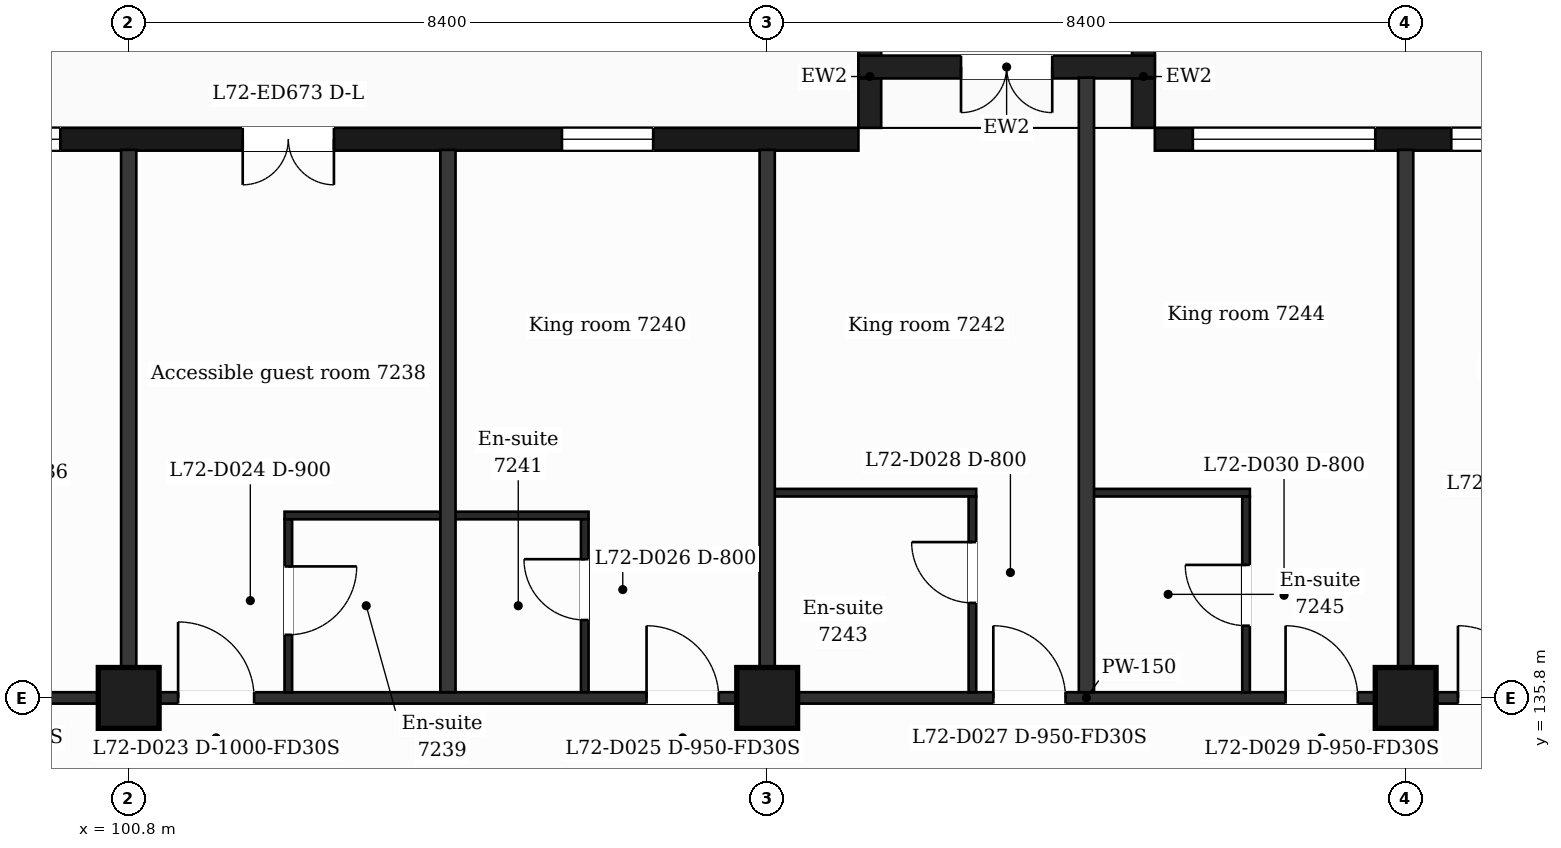
"""IFC4 building model, lengths in metres.
Left out: names, types, materials, properties, quantities, classifications, styles, units other than length and angle.
Written with IfcOpenShell. Run it as: python <this file> out.ifc"""

import sys

from ifc_helpers import new_model, si_unit, direction, frame, frame_2d, origin, origin_2d, place, context, subcontext, project, spatial, rectangle, extrude, element, fill, save


model = new_model("IFC4")
c1 = context("Model", 3, precision=1e-05, world=origin(), true_north=direction((0.0, 1.0)))
c2 = subcontext(c1, "Body", "Model", "MODEL_VIEW")
j1 = project(units=[si_unit("LENGTHUNIT", "METRE"), si_unit("PLANEANGLEUNIT", "RADIAN")], contexts=[c1])
p1 = place(None, origin())
s1 = spatial("IfcSite", under=j1, at=p1, CompositionType="ELEMENT")
p2 = place(p1, origin())
s2 = spatial("IfcBuilding", under=s1, at=p2, CompositionType="ELEMENT")
p3 = place(p2, frame((0.0, 0.0, 296.0)))
s3 = spatial("IfcBuildingStorey", under=s2, at=p3, CompositionType="ELEMENT", Elevation=296.0)
for number, where, z_axis, x_axis in (
    (1, (100.8, 135.8, 0.0), (0.0, 0.0, 1.0), (1.0, 0.0, 0.0)),
    (2, (109.2, 135.8, 0.0), (0.0, 0.0, 1.0), (1.0, 0.0, 0.0)),
    (3, (117.6, 135.8, 0.0), (0.0, 0.0, 1.0), (1.0, 0.0, 0.0)),
):
    element("IfcColumn", number, at=place(p3, frame(where, z_axis=z_axis, x_axis=x_axis)), inside=s3, PredefinedType="COLUMN", context=c2, shape_type="SweptSolid", body=[
        extrude(rectangle(XDim=0.8, YDim=0.8, at=origin_2d()), origin(), (0.0, 0.0, 1.0), 3.7),
    ])
p4 = place(p3, frame((130.65, 143.15, 0.0), z_axis=(0.0, 0.0, 1.0), x_axis=(-1.0, 0.0, 0.0)))
e4 = element("IfcWall", 4, at=p4, inside=s3, PredefinedType="SOLIDWALL", context=c2, shape_type="SweptSolid", body=[
    extrude(rectangle(XDim=16.35, YDim=0.3, at=frame_2d((8.175, 0.0))), origin(), (0.0, 0.0, 1.0), 3.38),
])
p5 = place(p4, frame((1.35, 0.0, 0.9)))
e5 = element("IfcOpeningElement", 5, at=p5, cuts=e4, PredefinedType="OPENING", context=c2, shape_type="SweptSolid", body=[
    extrude(rectangle(XDim=2.4, YDim=2.1, at=frame_2d((1.2, 1.05))), frame((0.0, 0.16, 0.0), z_axis=(0.0, -1.0, 0.0), x_axis=(1.0, 0.0, 0.0)), (0.0, 0.0, 1.0), 0.32),
])
p6 = place(p4, frame((5.55, 0.0, 0.9)))
e6 = element("IfcOpeningElement", 6, at=p6, cuts=e4, PredefinedType="OPENING", context=c2, shape_type="SweptSolid", body=[
    extrude(rectangle(XDim=2.4, YDim=2.1, at=frame_2d((1.2, 1.05))), frame((0.0, 0.16, 0.0), z_axis=(0.0, -1.0, 0.0), x_axis=(1.0, 0.0, 0.0)), (0.0, 0.0, 1.0), 0.32),
])
p7 = place(p4, frame((9.45, 0.0, 0.0)))
e7 = element("IfcOpeningElement", 7, at=p7, cuts=e4, PredefinedType="OPENING", context=c2, shape_type="SweptSolid", body=[
    extrude(rectangle(XDim=1.2, YDim=2.4, at=frame_2d((0.6, 1.2))), frame((0.0, 0.16, 0.0), z_axis=(0.0, -1.0, 0.0), x_axis=(1.0, 0.0, 0.0)), (0.0, 0.0, 1.0), 0.32),
])
p8 = place(p4, frame((11.25, 0.0, 0.9)))
e8 = element("IfcOpeningElement", 8, at=p8, cuts=e4, PredefinedType="OPENING", context=c2, shape_type="SweptSolid", body=[
    extrude(rectangle(XDim=1.2, YDim=2.1, at=frame_2d((0.6, 1.05))), frame((0.0, 0.16, 0.0), z_axis=(0.0, -1.0, 0.0), x_axis=(1.0, 0.0, 0.0)), (0.0, 0.0, 1.0), 0.32),
])
p9 = place(p4, frame((13.45, 0.0, 0.9)))
e9 = element("IfcOpeningElement", 9, at=p9, cuts=e4, PredefinedType="OPENING", context=c2, shape_type="SweptSolid", body=[
    extrude(rectangle(XDim=2.4, YDim=2.1, at=frame_2d((1.2, 1.05))), frame((0.0, 0.16, 0.0), z_axis=(0.0, -1.0, 0.0), x_axis=(1.0, 0.0, 0.0)), (0.0, 0.0, 1.0), 0.32),
])
p10 = place(p3, frame((110.4, 143.15, 0.0), z_axis=(0.0, 0.0, 1.0), x_axis=(-1.0, 0.0, 0.0)))
e10 = element("IfcWall", 10, at=p10, inside=s3, PredefinedType="SOLIDWALL", context=c2, shape_type="SweptSolid", body=[
    extrude(rectangle(XDim=14.4, YDim=0.3, at=frame_2d((7.2, 0.0))), origin(), (0.0, 0.0, 1.0), 3.38),
])
p11 = place(p10, frame((2.7, 0.0, 0.9)))
e11 = element("IfcOpeningElement", 11, at=p11, cuts=e10, PredefinedType="OPENING", context=c2, shape_type="SweptSolid", body=[
    extrude(rectangle(XDim=1.2, YDim=2.1, at=frame_2d((0.6, 1.05))), frame((0.0, 0.16, 0.0), z_axis=(0.0, -1.0, 0.0), x_axis=(1.0, 0.0, 0.0)), (0.0, 0.0, 1.0), 0.32),
])
p12 = place(p10, frame((6.9, 0.0, 0.0)))
e12 = element("IfcOpeningElement", 12, at=p12, cuts=e10, PredefinedType="OPENING", context=c2, shape_type="SweptSolid", body=[
    extrude(rectangle(XDim=1.2, YDim=2.4, at=frame_2d((0.6, 1.2))), frame((0.0, 0.16, 0.0), z_axis=(0.0, -1.0, 0.0), x_axis=(1.0, 0.0, 0.0)), (0.0, 0.0, 1.0), 0.32),
])
p13 = place(p10, frame((10.5, 0.0, 0.9)))
e13 = element("IfcOpeningElement", 13, at=p13, cuts=e10, PredefinedType="OPENING", context=c2, shape_type="SweptSolid", body=[
    extrude(rectangle(XDim=2.4, YDim=2.1, at=frame_2d((1.2, 1.05))), frame((0.0, 0.16, 0.0), z_axis=(0.0, -1.0, 0.0), x_axis=(1.0, 0.0, 0.0)), (0.0, 0.0, 1.0), 0.32),
])
for number, where, z_axis, x_axis in (
    (14, (114.15, 143.3, 0.0), (0.0, 0.0, 1.0), (0.0, 1.0, 0.0)),
    (15, (110.55, 143.3, 0.0), (0.0, 0.0, 1.0), (0.0, 1.0, 0.0)),
):
    element("IfcWall", number, at=place(p3, frame(where, z_axis=z_axis, x_axis=x_axis)), inside=s3, PredefinedType="SOLIDWALL", context=c2, shape_type="SweptSolid", body=[
        extrude(rectangle(XDim=1.35, YDim=0.3, at=frame_2d((0.675, 0.0))), origin(), (0.0, 0.0, 1.0), 3.38),
    ])
p14 = place(p3, frame((114.3, 144.1, 0.0), z_axis=(0.0, 0.0, 1.0), x_axis=(-1.0, 0.0, 0.0)))
e16 = element("IfcWall", 16, at=p14, inside=s3, PredefinedType="SOLIDWALL", context=c2, shape_type="SweptSolid", body=[
    extrude(rectangle(XDim=3.9, YDim=0.3, at=frame_2d((1.95, 0.0))), origin(), (0.0, 0.0, 1.0), 3.38),
])
p15 = place(p14, frame((1.35, 0.0, 0.0)))
e17 = element("IfcOpeningElement", 17, at=p15, cuts=e16, PredefinedType="OPENING", context=c2, shape_type="SweptSolid", body=[
    extrude(rectangle(XDim=1.2, YDim=2.4, at=frame_2d((0.6, 1.2))), frame((0.0, 0.16, 0.0), z_axis=(0.0, -1.0, 0.0), x_axis=(1.0, 0.0, 0.0)), (0.0, 0.0, 1.0), 0.32),
])
p16 = place(p3, frame((90.895, 135.8, 0.0), z_axis=(0.0, 0.0, 1.0), x_axis=(1.0, 0.0, 0.0)))
e18 = element("IfcWall", 18, at=p16, inside=s3, PredefinedType="PARTITIONING", context=c2, shape_type="SweptSolid", body=[
    extrude(rectangle(XDim=45.011, YDim=0.15, at=frame_2d((22.505, 0.0))), origin(), (0.0, 0.0, 1.0), 3.38),
])
p17 = place(p16, frame((6.906, 0.0, 0.0)))
e19 = element("IfcOpeningElement", 19, at=p17, cuts=e18, PredefinedType="OPENING", context=c2, shape_type="SweptSolid", body=[
    extrude(rectangle(XDim=1.0, YDim=2.1, at=frame_2d((0.5, 1.05))), frame((0.0, 0.085, 0.0), z_axis=(0.0, -1.0, 0.0), x_axis=(1.0, 0.0, 0.0)), (0.0, 0.0, 1.0), 0.17),
])
p18 = place(p16, frame((10.555, 0.0, 0.0)))
e20 = element("IfcOpeningElement", 20, at=p18, cuts=e18, PredefinedType="OPENING", context=c2, shape_type="SweptSolid", body=[
    extrude(rectangle(XDim=1.0, YDim=2.1, at=frame_2d((0.5, 1.05))), frame((0.0, 0.085, 0.0), z_axis=(0.0, -1.0, 0.0), x_axis=(1.0, 0.0, 0.0)), (0.0, 0.0, 1.0), 0.17),
])
p19 = place(p16, frame((16.719, 0.0, 0.0)))
e21 = element("IfcOpeningElement", 21, at=p19, cuts=e18, PredefinedType="OPENING", context=c2, shape_type="SweptSolid", body=[
    extrude(rectangle(XDim=0.95, YDim=2.1, at=frame_2d((0.475, 1.05))), frame((0.0, 0.085, 0.0), z_axis=(0.0, -1.0, 0.0), x_axis=(1.0, 0.0, 0.0)), (0.0, 0.0, 1.0), 0.17),
])
p20 = place(p16, frame((21.281, 0.0, 0.0)))
e22 = element("IfcOpeningElement", 22, at=p20, cuts=e18, PredefinedType="OPENING", context=c2, shape_type="SweptSolid", body=[
    extrude(rectangle(XDim=0.95, YDim=2.1, at=frame_2d((0.475, 1.05))), frame((0.0, 0.085, 0.0), z_axis=(0.0, -1.0, 0.0), x_axis=(1.0, 0.0, 0.0)), (0.0, 0.0, 1.0), 0.17),
])
p21 = place(p16, frame((25.125, 0.0, 0.0)))
e23 = element("IfcOpeningElement", 23, at=p21, cuts=e18, PredefinedType="OPENING", context=c2, shape_type="SweptSolid", body=[
    extrude(rectangle(XDim=0.95, YDim=2.1, at=frame_2d((0.475, 1.05))), frame((0.0, 0.085, 0.0), z_axis=(0.0, -1.0, 0.0), x_axis=(1.0, 0.0, 0.0)), (0.0, 0.0, 1.0), 0.17),
])
p22 = place(p16, frame((27.393, 0.0, 0.0)))
e24 = element("IfcOpeningElement", 24, at=p22, cuts=e18, PredefinedType="OPENING", context=c2, shape_type="SweptSolid", body=[
    extrude(rectangle(XDim=0.95, YDim=2.1, at=frame_2d((0.475, 1.05))), frame((0.0, 0.085, 0.0), z_axis=(0.0, -1.0, 0.0), x_axis=(1.0, 0.0, 0.0)), (0.0, 0.0, 1.0), 0.17),
])
p23 = place(p16, frame((33.518, 0.0, 0.0)))
e25 = element("IfcOpeningElement", 25, at=p23, cuts=e18, PredefinedType="OPENING", context=c2, shape_type="SweptSolid", body=[
    extrude(rectangle(XDim=0.95, YDim=2.1, at=frame_2d((0.475, 1.05))), frame((0.0, 0.085, 0.0), z_axis=(0.0, -1.0, 0.0), x_axis=(1.0, 0.0, 0.0)), (0.0, 0.0, 1.0), 0.17),
])
p24 = place(p16, frame((37.615, 0.0, 0.0)))
e26 = element("IfcOpeningElement", 26, at=p24, cuts=e18, PredefinedType="OPENING", context=c2, shape_type="SweptSolid", body=[
    extrude(rectangle(XDim=1.0, YDim=2.1, at=frame_2d((0.5, 1.05))), frame((0.0, 0.085, 0.0), z_axis=(0.0, -1.0, 0.0), x_axis=(1.0, 0.0, 0.0)), (0.0, 0.0, 1.0), 0.17),
])
p25 = place(p3, frame((102.85, 138.2, 0.0), z_axis=(0.0, 0.0, 1.0), x_axis=(1.0, 0.0, 0.0)))
e27 = element("IfcWall", 27, at=p25, inside=s3, PredefinedType="PARTITIONING", context=c2, shape_type="SweptSolid", body=[
    extrude(rectangle(XDim=4.0, YDim=0.1, at=frame_2d((2.0, 0.0))), origin(), (0.0, 0.0, 1.0), 3.38),
])
p26 = place(p3, frame((109.2, 138.5, 0.0), z_axis=(0.0, 0.0, 1.0), x_axis=(1.0, 0.0, 0.0)))
e28 = element("IfcWall", 28, at=p26, inside=s3, PredefinedType="PARTITIONING", context=c2, shape_type="SweptSolid", body=[
    extrude(rectangle(XDim=2.75, YDim=0.1, at=frame_2d((1.375, 0.0))), origin(), (0.0, 0.0, 1.0), 3.38),
])
p27 = place(p3, frame((113.4, 138.5, 0.0), z_axis=(0.0, 0.0, 1.0), x_axis=(1.0, 0.0, 0.0)))
e29 = element("IfcWall", 29, at=p27, inside=s3, PredefinedType="PARTITIONING", context=c2, shape_type="SweptSolid", body=[
    extrude(rectangle(XDim=2.15, YDim=0.1, at=frame_2d((1.075, 0.0))), origin(), (0.0, 0.0, 1.0), 3.38),
])
p28 = place(p3, frame((100.8, 135.875, 0.0), z_axis=(0.0, 0.0, 1.0), x_axis=(0.0, 1.0, 0.0)))
e30 = element("IfcWall", 30, at=p28, inside=s3, PredefinedType="PARTITIONING", context=c2, shape_type="SweptSolid", body=[
    extrude(rectangle(XDim=7.135, YDim=0.2, at=frame_2d((3.567, 0.0))), origin(), (0.0, 0.0, 1.0), 3.38),
])
p29 = place(p3, frame((102.9, 135.875, 0.0), z_axis=(0.0, 0.0, 1.0), x_axis=(0.0, 1.0, 0.0)))
e31 = element("IfcWall", 31, at=p29, inside=s3, PredefinedType="PARTITIONING", context=c2, shape_type="SweptSolid", body=[
    extrude(rectangle(XDim=2.275, YDim=0.1, at=frame_2d((1.137, 0.0))), origin(), (0.0, 0.0, 1.0), 3.38),
])
p30 = place(p29, frame((0.755, 0.0, 0.0)))
e32 = element("IfcOpeningElement", 32, at=p30, cuts=e31, PredefinedType="OPENING", context=c2, shape_type="SweptSolid", body=[
    extrude(rectangle(XDim=0.9, YDim=2.1, at=frame_2d((0.45, 1.05))), frame((0.0, 0.06, 0.0), z_axis=(0.0, -1.0, 0.0), x_axis=(1.0, 0.0, 0.0)), (0.0, 0.0, 1.0), 0.12),
])
p31 = place(p3, frame((105.0, 135.875, 0.0), z_axis=(0.0, 0.0, 1.0), x_axis=(0.0, 1.0, 0.0)))
e33 = element("IfcWall", 33, at=p31, inside=s3, PredefinedType="PARTITIONING", context=c2, shape_type="SweptSolid", body=[
    extrude(rectangle(XDim=7.135, YDim=0.2, at=frame_2d((3.567, 0.0))), origin(), (0.0, 0.0, 1.0), 3.38),
])
p32 = place(p3, frame((106.8, 135.875, 0.0), z_axis=(0.0, 0.0, 1.0), x_axis=(0.0, 1.0, 0.0)))
e34 = element("IfcWall", 34, at=p32, inside=s3, PredefinedType="PARTITIONING", context=c2, shape_type="SweptSolid", body=[
    extrude(rectangle(XDim=2.275, YDim=0.1, at=frame_2d((1.137, 0.0))), origin(), (0.0, 0.0, 1.0), 3.38),
])
p33 = place(p32, frame((0.95, 0.0, 0.0)))
e35 = element("IfcOpeningElement", 35, at=p33, cuts=e34, PredefinedType="OPENING", context=c2, shape_type="SweptSolid", body=[
    extrude(rectangle(XDim=0.8, YDim=2.1, at=frame_2d((0.4, 1.05))), frame((0.0, 0.06, 0.0), z_axis=(0.0, -1.0, 0.0), x_axis=(1.0, 0.0, 0.0)), (0.0, 0.0, 1.0), 0.12),
])
p34 = place(p3, frame((109.2, 135.875, 0.0), z_axis=(0.0, 0.0, 1.0), x_axis=(0.0, 1.0, 0.0)))
e36 = element("IfcWall", 36, at=p34, inside=s3, PredefinedType="PARTITIONING", context=c2, shape_type="SweptSolid", body=[
    extrude(rectangle(XDim=7.135, YDim=0.2, at=frame_2d((3.567, 0.0))), origin(), (0.0, 0.0, 1.0), 3.38),
])
p35 = place(p3, frame((111.9, 135.875, 0.0), z_axis=(0.0, 0.0, 1.0), x_axis=(0.0, 1.0, 0.0)))
e37 = element("IfcWall", 37, at=p35, inside=s3, PredefinedType="PARTITIONING", context=c2, shape_type="SweptSolid", body=[
    extrude(rectangle(XDim=2.575, YDim=0.1, at=frame_2d((1.288, 0.0))), origin(), (0.0, 0.0, 1.0), 3.38),
])
p36 = place(p35, frame((1.175, 0.0, 0.0)))
e38 = element("IfcOpeningElement", 38, at=p36, cuts=e37, PredefinedType="OPENING", context=c2, shape_type="SweptSolid", body=[
    extrude(rectangle(XDim=0.8, YDim=2.1, at=frame_2d((0.4, 1.05))), frame((0.0, 0.06, 0.0), z_axis=(0.0, -1.0, 0.0), x_axis=(1.0, 0.0, 0.0)), (0.0, 0.0, 1.0), 0.12),
])
p37 = place(p3, frame((113.4, 135.875, 0.0), z_axis=(0.0, 0.0, 1.0), x_axis=(0.0, 1.0, 0.0)))
e39 = element("IfcWall", 39, at=p37, inside=s3, PredefinedType="PARTITIONING", context=c2, shape_type="SweptSolid", body=[
    extrude(rectangle(XDim=8.085, YDim=0.2, at=frame_2d((4.042, 0.0))), origin(), (0.0, 0.0, 1.0), 3.38),
])
p38 = place(p3, frame((115.5, 135.875, 0.0), z_axis=(0.0, 0.0, 1.0), x_axis=(0.0, 1.0, 0.0)))
e40 = element("IfcWall", 40, at=p38, inside=s3, PredefinedType="PARTITIONING", context=c2, shape_type="SweptSolid", body=[
    extrude(rectangle(XDim=2.575, YDim=0.1, at=frame_2d((1.288, 0.0))), origin(), (0.0, 0.0, 1.0), 3.38),
])
p39 = place(p38, frame((0.875, 0.0, 0.0)))
e41 = element("IfcOpeningElement", 41, at=p39, cuts=e40, PredefinedType="OPENING", context=c2, shape_type="SweptSolid", body=[
    extrude(rectangle(XDim=0.8, YDim=2.1, at=frame_2d((0.4, 1.05))), frame((0.0, 0.06, 0.0), z_axis=(0.0, -1.0, 0.0), x_axis=(1.0, 0.0, 0.0)), (0.0, 0.0, 1.0), 0.12),
])
p40 = place(p3, frame((117.6, 135.875, 0.0), z_axis=(0.0, 0.0, 1.0), x_axis=(0.0, 1.0, 0.0)))
e42 = element("IfcWall", 42, at=p40, inside=s3, PredefinedType="PARTITIONING", context=c2, shape_type="SweptSolid", body=[
    extrude(rectangle(XDim=7.135, YDim=0.2, at=frame_2d((3.567, 0.0))), origin(), (0.0, 0.0, 1.0), 3.38),
])
p41 = place(p8, origin())
e43 = element("IfcWindow", 43, at=p41, inside=s3, PartitioningType="SINGLE_PANEL", PredefinedType="WINDOW", context=c2, shape_type="SweptSolid", body=[
    extrude(rectangle(XDim=1.2, YDim=2.1, at=frame_2d((0.6, 1.05))), frame((0.0, 0.03, 0.0), z_axis=(0.0, -1.0, 0.0), x_axis=(1.0, 0.0, 0.0)), (0.0, 0.0, 1.0), 0.06),
])
fill(e8, e43)
p42 = place(p9, origin())
e44 = element("IfcWindow", 44, at=p42, inside=s3, PartitioningType="SINGLE_PANEL", PredefinedType="WINDOW", context=c2, shape_type="SweptSolid", body=[
    extrude(rectangle(XDim=2.4, YDim=2.1, at=frame_2d((1.2, 1.05))), frame((0.0, 0.03, 0.0), z_axis=(0.0, -1.0, 0.0), x_axis=(1.0, 0.0, 0.0)), (0.0, 0.0, 1.0), 0.06),
])
fill(e9, e44)
p43 = place(p11, origin())
e45 = element("IfcWindow", 45, at=p43, inside=s3, PartitioningType="SINGLE_PANEL", PredefinedType="WINDOW", context=c2, shape_type="SweptSolid", body=[
    extrude(rectangle(XDim=1.2, YDim=2.1, at=frame_2d((0.6, 1.05))), frame((0.0, 0.03, 0.0), z_axis=(0.0, -1.0, 0.0), x_axis=(1.0, 0.0, 0.0)), (0.0, 0.0, 1.0), 0.06),
])
fill(e11, e45)
p44 = place(p12, origin())
e46 = element("IfcDoor", 46, at=p44, inside=s3, OperationType="DOUBLE_DOOR_SINGLE_SWING", PredefinedType="DOOR", context=c2, shape_type="SweptSolid", body=[
    extrude(rectangle(XDim=1.2, YDim=2.4, at=frame_2d((0.6, 1.2))), frame((0.0, 0.025, 0.0), z_axis=(0.0, -1.0, 0.0), x_axis=(1.0, 0.0, 0.0)), (0.0, 0.0, 1.0), 0.05),
])
fill(e12, e46)
p45 = place(p13, origin())
e47 = element("IfcWindow", 47, at=p45, inside=s3, PartitioningType="SINGLE_PANEL", PredefinedType="WINDOW", context=c2, shape_type="SweptSolid", body=[
    extrude(rectangle(XDim=2.4, YDim=2.1, at=frame_2d((1.2, 1.05))), frame((0.0, 0.03, 0.0), z_axis=(0.0, -1.0, 0.0), x_axis=(1.0, 0.0, 0.0)), (0.0, 0.0, 1.0), 0.06),
])
fill(e13, e47)
p46 = place(p15, origin())
e48 = element("IfcDoor", 48, at=p46, inside=s3, OperationType="DOUBLE_DOOR_SINGLE_SWING", PredefinedType="DOOR", context=c2, shape_type="SweptSolid", body=[
    extrude(rectangle(XDim=1.2, YDim=2.4, at=frame_2d((0.6, 1.2))), frame((0.0, 0.025, 0.0), z_axis=(0.0, -1.0, 0.0), x_axis=(1.0, 0.0, 0.0)), (0.0, 0.0, 1.0), 0.05),
])
fill(e17, e48)
p47 = place(p18, origin())
e49 = element("IfcDoor", 49, at=p47, inside=s3, OperationType="SINGLE_SWING_LEFT", PredefinedType="DOOR", context=c2, shape_type="SweptSolid", body=[
    extrude(rectangle(XDim=1.0, YDim=2.1, at=frame_2d((0.5, 1.05))), frame((0.0, 0.025, 0.0), z_axis=(0.0, -1.0, 0.0), x_axis=(1.0, 0.0, 0.0)), (0.0, 0.0, 1.0), 0.05),
])
fill(e20, e49)
p48 = place(p30, origin())
e50 = element("IfcDoor", 50, at=p48, inside=s3, OperationType="SINGLE_SWING_RIGHT", PredefinedType="DOOR", context=c2, shape_type="SweptSolid", body=[
    extrude(rectangle(XDim=0.9, YDim=2.1, at=frame_2d((0.45, 1.05))), frame((0.0, 0.025, 0.0), z_axis=(0.0, -1.0, 0.0), x_axis=(1.0, 0.0, 0.0)), (0.0, 0.0, 1.0), 0.05),
])
fill(e32, e50)
p49 = place(p19, origin())
e51 = element("IfcDoor", 51, at=p49, inside=s3, OperationType="SINGLE_SWING_LEFT", PredefinedType="DOOR", context=c2, shape_type="SweptSolid", body=[
    extrude(rectangle(XDim=0.95, YDim=2.1, at=frame_2d((0.475, 1.05))), frame((0.0, 0.025, 0.0), z_axis=(0.0, -1.0, 0.0), x_axis=(1.0, 0.0, 0.0)), (0.0, 0.0, 1.0), 0.05),
])
fill(e21, e51)
p50 = place(p33, origin())
e52 = element("IfcDoor", 52, at=p50, inside=s3, OperationType="SINGLE_SWING_RIGHT", PredefinedType="DOOR", context=c2, shape_type="SweptSolid", body=[
    extrude(rectangle(XDim=0.8, YDim=2.1, at=frame_2d((0.4, 1.05))), frame((0.0, 0.025, 0.0), z_axis=(0.0, -1.0, 0.0), x_axis=(1.0, 0.0, 0.0)), (0.0, 0.0, 1.0), 0.05),
])
fill(e35, e52)
p51 = place(p20, origin())
e53 = element("IfcDoor", 53, at=p51, inside=s3, OperationType="SINGLE_SWING_LEFT", PredefinedType="DOOR", context=c2, shape_type="SweptSolid", body=[
    extrude(rectangle(XDim=0.95, YDim=2.1, at=frame_2d((0.475, 1.05))), frame((0.0, 0.025, 0.0), z_axis=(0.0, -1.0, 0.0), x_axis=(1.0, 0.0, 0.0)), (0.0, 0.0, 1.0), 0.05),
])
fill(e22, e53)
p52 = place(p36, origin())
e54 = element("IfcDoor", 54, at=p52, inside=s3, OperationType="SINGLE_SWING_RIGHT", PredefinedType="DOOR", context=c2, shape_type="SweptSolid", body=[
    extrude(rectangle(XDim=0.8, YDim=2.1, at=frame_2d((0.4, 1.05))), frame((0.0, 0.025, 0.0), z_axis=(0.0, -1.0, 0.0), x_axis=(1.0, 0.0, 0.0)), (0.0, 0.0, 1.0), 0.05),
])
fill(e38, e54)
p53 = place(p21, origin())
e55 = element("IfcDoor", 55, at=p53, inside=s3, OperationType="SINGLE_SWING_LEFT", PredefinedType="DOOR", context=c2, shape_type="SweptSolid", body=[
    extrude(rectangle(XDim=0.95, YDim=2.1, at=frame_2d((0.475, 1.05))), frame((0.0, 0.025, 0.0), z_axis=(0.0, -1.0, 0.0), x_axis=(1.0, 0.0, 0.0)), (0.0, 0.0, 1.0), 0.05),
])
fill(e23, e55)
p54 = place(p39, origin())
e56 = element("IfcDoor", 56, at=p54, inside=s3, OperationType="SINGLE_SWING_RIGHT", PredefinedType="DOOR", context=c2, shape_type="SweptSolid", body=[
    extrude(rectangle(XDim=0.8, YDim=2.1, at=frame_2d((0.4, 1.05))), frame((0.0, 0.025, 0.0), z_axis=(0.0, -1.0, 0.0), x_axis=(1.0, 0.0, 0.0)), (0.0, 0.0, 1.0), 0.05),
])
fill(e41, e56)
p55 = place(p22, origin())
e57 = element("IfcDoor", 57, at=p55, inside=s3, OperationType="SINGLE_SWING_LEFT", PredefinedType="DOOR", context=c2, shape_type="SweptSolid", body=[
    extrude(rectangle(XDim=0.95, YDim=2.1, at=frame_2d((0.475, 1.05))), frame((0.0, 0.025, 0.0), z_axis=(0.0, -1.0, 0.0), x_axis=(1.0, 0.0, 0.0)), (0.0, 0.0, 1.0), 0.05),
])
fill(e24, e57)
save(model, sys.argv[1])
